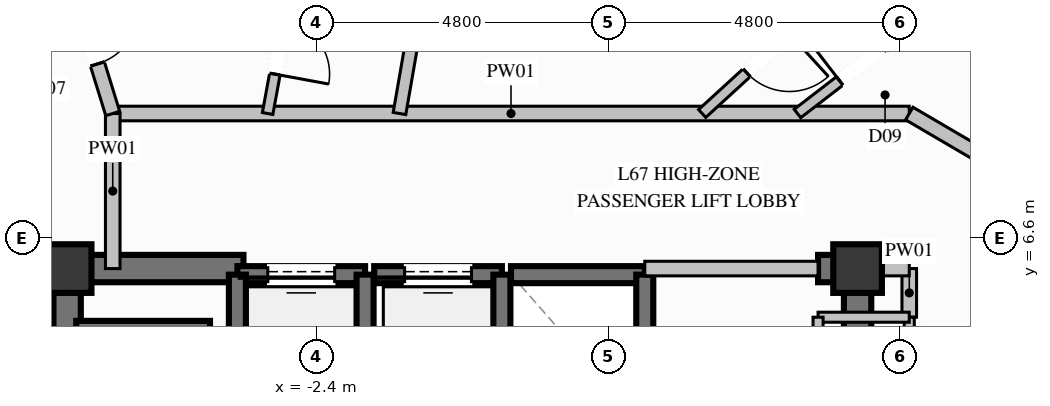
"""IFC4 building model, lengths in metres.
Left out: names, types, materials, properties, quantities, classifications, styles, units other than length and angle.
Written with IfcOpenShell. Run it as: python <this file> out.ifc"""

import sys

from ifc_helpers import new_model, si_unit, direction, frame, frame_2d, origin, origin_2d, place, context, subcontext, project, spatial, rectangle, extrude, element, fill, save


model = new_model("IFC4")
c1 = context("Model", 3, precision=1e-05, world=origin(), true_north=direction((0.0, 1.0)))
c2 = subcontext(c1, "Body", "Model", "MODEL_VIEW")
j1 = project(units=[si_unit("LENGTHUNIT", "METRE"), si_unit("PLANEANGLEUNIT", "RADIAN")], contexts=[c1])
p1 = place(None, origin())
s1 = spatial("IfcSite", under=j1, at=p1, CompositionType="ELEMENT")
p2 = place(p1, origin())
s2 = spatial("IfcBuilding", under=s1, at=p2, CompositionType="ELEMENT")
p3 = place(p2, frame((0.0, 0.0, 258.2)))
s3 = spatial("IfcBuildingStorey", under=s2, at=p3, CompositionType="ELEMENT", Elevation=258.2)
for number, where, z_axis, x_axis in (
    (1, (6.5, 6.1, 0.0), (0.0, 0.0, 1.0), (1.0, 0.0, 0.0)),
    (2, (-6.5, 6.1, 0.0), (0.0, 0.0, 1.0), (1.0, 0.0, 0.0)),
):
    element("IfcColumn", number, at=place(p3, frame(where, z_axis=z_axis, x_axis=x_axis)), inside=s3, PredefinedType="COLUMN", context=c2, shape_type="SweptSolid", body=[
        extrude(rectangle(XDim=0.8, YDim=0.8, at=origin_2d()), origin(), (0.0, 0.0, 1.0), 3.8),
    ])
p4 = place(p3, frame((-6.275, 6.1, 0.0), z_axis=(0.0, 0.0, 1.0), x_axis=(1.0, 0.0, 0.0)))
e3 = element("IfcWall", 3, at=p4, inside=s3, PredefinedType="SHEAR", context=c2, shape_type="SweptSolid", body=[
    extrude(rectangle(XDim=2.675, YDim=0.45, at=frame_2d((1.337, 0.0))), origin(), (0.0, 0.0, 1.0), 3.8),
])
p5 = place(p3, frame((5.85, 6.1, 0.0), z_axis=(0.0, 0.0, 1.0), x_axis=(1.0, 0.0, 0.0)))
e4 = element("IfcWall", 4, at=p5, inside=s3, PredefinedType="SHEAR", context=c2, shape_type="SweptSolid", body=[
    extrude(rectangle(XDim=0.425, YDim=0.45, at=frame_2d((0.212, 0.0))), origin(), (0.0, 0.0, 1.0), 3.8),
])
p6 = place(p3, frame((-6.5, 2.35, 0.0), z_axis=(0.0, 0.0, 1.0), x_axis=(0.0, 1.0, 0.0)))
e5 = element("IfcWall", 5, at=p6, inside=s3, PredefinedType="SHEAR", context=c2, shape_type="SweptSolid", body=[
    extrude(rectangle(XDim=3.975, YDim=0.45, at=frame_2d((1.987, 0.0))), origin(), (0.0, 0.0, 1.0), 3.8),
])
p7 = place(p3, frame((6.5, 3.35, 0.0), z_axis=(0.0, 0.0, 1.0), x_axis=(0.0, 1.0, 0.0)))
e6 = element("IfcWall", 6, at=p7, inside=s3, PredefinedType="SHEAR", context=c2, shape_type="SweptSolid", body=[
    extrude(rectangle(XDim=2.975, YDim=0.45, at=frame_2d((1.487, 0.0))), origin(), (0.0, 0.0, 1.0), 3.8),
])
p8 = place(p3, frame((-1.6, 6.0, 0.0), z_axis=(0.0, 0.0, 1.0), x_axis=(-1.0, 0.0, 0.0)))
e7 = element("IfcWall", 7, at=p8, inside=s3, PredefinedType="SOLIDWALL", context=c2, shape_type="SweptSolid", body=[
    extrude(rectangle(XDim=2.1, YDim=0.28, at=frame_2d((1.05, 0.0))), origin(), (0.0, 0.0, 1.0), 3.57),
])
p9 = place(p8, frame((0.5, 0.0, 0.0)))
e8 = element("IfcOpeningElement", 8, at=p9, cuts=e7, PredefinedType="OPENING", context=c2, shape_type="SweptSolid", body=[
    extrude(rectangle(XDim=1.1, YDim=2.2, at=frame_2d((0.55, 1.1))), frame((0.0, 0.15, 0.0), z_axis=(0.0, -1.0, 0.0), x_axis=(1.0, 0.0, 0.0)), (0.0, 0.0, 1.0), 0.3),
])
for number, where, z_axis, x_axis in (
    (9, (-3.7, 6.0, 0.0), (0.0, 0.0, 1.0), (0.0, -1.0, 0.0)),
    (10, (-1.6, 3.5, 0.0), (0.0, 0.0, 1.0), (0.0, 1.0, 0.0)),
):
    element("IfcWall", number, at=place(p3, frame(where, z_axis=z_axis, x_axis=x_axis)), inside=s3, PredefinedType="SOLIDWALL", context=c2, shape_type="SweptSolid", body=[
        extrude(rectangle(XDim=2.5, YDim=0.28, at=frame_2d((1.25, 0.0))), origin(), (0.0, 0.0, 1.0), 3.57),
    ])
p10 = place(p3, frame((0.65, 6.0, 0.0), z_axis=(0.0, 0.0, 1.0), x_axis=(-1.0, 0.0, 0.0)))
e11 = element("IfcWall", 11, at=p10, inside=s3, PredefinedType="SOLIDWALL", context=c2, shape_type="SweptSolid", body=[
    extrude(rectangle(XDim=2.1, YDim=0.28, at=frame_2d((1.05, 0.0))), origin(), (0.0, 0.0, 1.0), 3.57),
])
p11 = place(p10, frame((0.5, 0.0, 0.0)))
e12 = element("IfcOpeningElement", 12, at=p11, cuts=e11, PredefinedType="OPENING", context=c2, shape_type="SweptSolid", body=[
    extrude(rectangle(XDim=1.1, YDim=2.2, at=frame_2d((0.55, 1.1))), frame((0.0, 0.15, 0.0), z_axis=(0.0, -1.0, 0.0), x_axis=(1.0, 0.0, 0.0)), (0.0, 0.0, 1.0), 0.3),
])
p12 = place(p3, frame((0.65, 3.5, 0.0), z_axis=(0.0, 0.0, 1.0), x_axis=(0.0, 1.0, 0.0)))
e13 = element("IfcWall", 13, at=p12, inside=s3, PredefinedType="SOLIDWALL", context=c2, shape_type="SweptSolid", body=[
    extrude(rectangle(XDim=2.5, YDim=0.28, at=frame_2d((1.25, 0.0))), origin(), (0.0, 0.0, 1.0), 3.57),
])
p13 = place(p3, frame((3.0, 6.0, 0.0), z_axis=(0.0, 0.0, 1.0), x_axis=(-1.0, 0.0, 0.0)))
e14 = element("IfcWall", 14, at=p13, inside=s3, PredefinedType="SOLIDWALL", context=c2, shape_type="SweptSolid", body=[
    extrude(rectangle(XDim=2.2, YDim=0.28, at=frame_2d((1.1, 0.0))), origin(), (0.0, 0.0, 1.0), 3.57),
])
p14 = place(p3, frame((3.0, 3.5, 0.0), z_axis=(0.0, 0.0, 1.0), x_axis=(0.0, 1.0, 0.0)))
e15 = element("IfcWall", 15, at=p14, inside=s3, PredefinedType="SOLIDWALL", context=c2, shape_type="SweptSolid", body=[
    extrude(rectangle(XDim=2.5, YDim=0.28, at=frame_2d((1.25, 0.0))), origin(), (0.0, 0.0, 1.0), 3.57),
])
p15 = place(p3, frame((-4.15, 5.1, 0.0), z_axis=(0.0, 0.0, 1.0), x_axis=(-1.0, 0.0, 0.0)))
e16 = element("IfcWall", 16, at=p15, inside=s3, PredefinedType="SOLIDWALL", context=c2, shape_type="SweptSolid", body=[
    extrude(rectangle(XDim=2.2, YDim=0.28, at=frame_2d((1.1, 0.0))), origin(), (0.0, 0.0, 1.0), 3.57),
])
p16 = place(p3, frame((-5.75, 8.65, 0.0), z_axis=(0.0, 0.0, 1.0), x_axis=(1.0, 0.0, 0.0)))
e17 = element("IfcWall", 17, at=p16, inside=s3, PredefinedType="PARTITIONING", context=c2, shape_type="SweptSolid", body=[
    extrude(rectangle(XDim=13.1, YDim=0.24, at=frame_2d((6.55, 0.0))), origin(), (0.0, 0.0, 1.0), 3.57),
])
p17 = place(p3, frame((3.0, 6.1, 0.0), z_axis=(0.0, 0.0, 1.0), x_axis=(1.0, 0.0, 0.0)))
e18 = element("IfcWall", 18, at=p17, inside=s3, PredefinedType="PARTITIONING", context=c2, shape_type="SweptSolid", body=[
    extrude(rectangle(XDim=2.85, YDim=0.24, at=frame_2d((1.425, 0.0))), origin(), (0.0, 0.0, 1.0), 2.655),
])
p18 = place(p3, frame((7.35, 5.3, 0.0), z_axis=(0.0, 0.0, 1.0), x_axis=(0.0, 1.0, 0.0)))
e19 = element("IfcWall", 19, at=p18, inside=s3, PredefinedType="PARTITIONING", context=c2, shape_type="SweptSolid", body=[
    extrude(rectangle(XDim=0.8, YDim=0.24, at=frame_2d((0.4, 0.0))), origin(), (0.0, 0.0, 1.0), 2.655),
])
p19 = place(p3, frame((6.5, 6.1, 0.0), z_axis=(0.0, 0.0, 1.0), x_axis=(1.0, 0.0, 0.0)))
e20 = element("IfcWall", 20, at=p19, inside=s3, PredefinedType="PARTITIONING", context=c2, shape_type="SweptSolid", body=[
    extrude(rectangle(XDim=0.85, YDim=0.24, at=frame_2d((0.425, 0.0))), origin(), (0.0, 0.0, 1.0), 3.085),
])
p20 = place(p3, frame((-5.75, 6.1, 0.0), z_axis=(0.0, 0.0, 1.0), x_axis=(0.0, 1.0, 0.0)))
e21 = element("IfcWall", 21, at=p20, inside=s3, PredefinedType="PARTITIONING", context=c2, shape_type="SweptSolid", body=[
    extrude(rectangle(XDim=2.55, YDim=0.24, at=frame_2d((1.275, 0.0))), origin(), (0.0, 0.0, 1.0), 3.57),
])
p21 = place(p3, frame((-7.35, 6.1, 0.0), z_axis=(0.0, 0.0, 1.0), x_axis=(1.0, 0.0, 0.0)))
e22 = element("IfcWall", 22, at=p21, inside=s3, PredefinedType="PARTITIONING", context=c2, shape_type="SweptSolid", body=[
    extrude(rectangle(XDim=0.85, YDim=0.24, at=frame_2d((0.425, 0.0))), origin(), (0.0, 0.0, 1.0), 3.085),
])
p22 = place(p3, frame((7.35, 3.35, 0.0), z_axis=(0.0, 0.0, 1.0), x_axis=(0.0, 1.0, 0.0)))
e23 = element("IfcWall", 23, at=p22, inside=s3, PredefinedType="PARTITIONING", context=c2, shape_type="SweptSolid", body=[
    extrude(rectangle(XDim=1.95, YDim=0.165, at=frame_2d((0.975, 0.0))), origin(), (0.0, 0.0, 1.0), 3.57),
])
p23 = place(p22, frame((0.5, 0.0, 0.0)))
e24 = element("IfcOpeningElement", 24, at=p23, cuts=e23, PredefinedType="OPENING", context=c2, shape_type="SweptSolid", body=[
    extrude(rectangle(XDim=0.95, YDim=2.1, at=frame_2d((0.475, 1.05))), frame((0.0, 0.093, 0.0), z_axis=(0.0, -1.0, 0.0), x_axis=(1.0, 0.0, 0.0)), (0.0, 0.0, 1.0), 0.185),
])
p24 = place(p3, frame((7.35, 5.3, 0.0), z_axis=(0.0, 0.0, 1.0), x_axis=(-1.0, 0.0, 0.0)))
e25 = element("IfcWall", 25, at=p24, inside=s3, PredefinedType="PARTITIONING", context=c2, shape_type="SweptSolid", body=[
    extrude(rectangle(XDim=1.5, YDim=0.165, at=frame_2d((0.75, 0.0))), origin(), (0.0, 0.0, 1.0), 2.655),
])
p25 = place(p3, frame((5.85, 5.3, 0.0), z_axis=(0.0, 0.0, 1.0), x_axis=(0.0, -1.0, 0.0)))
e26 = element("IfcWall", 26, at=p25, inside=s3, PredefinedType="PARTITIONING", context=c2, shape_type="SweptSolid", body=[
    extrude(rectangle(XDim=1.95, YDim=0.165, at=frame_2d((0.975, 0.0))), origin(), (0.0, 0.0, 1.0), 2.655),
])
p26 = place(p3, frame((6.11, 10.632, 0.0), z_axis=(0.0, 0.0, 1.0), x_axis=(-0.737719939181, -0.675106874009, 0.0)))
e27 = element("IfcWall", 27, at=p26, inside=s3, PredefinedType="PLUMBINGWALL", context=c2, shape_type="SweptSolid", body=[
    extrude(rectangle(XDim=2.936, YDim=0.175, at=frame_2d((1.468, 0.0))), origin(), (0.0, 0.0, 1.0), 3.57),
])
p27 = place(p26, frame((0.993, 0.0, 0.0)))
e28 = element("IfcOpeningElement", 28, at=p27, cuts=e27, PredefinedType="OPENING", context=c2, shape_type="SweptSolid", body=[
    extrude(rectangle(XDim=0.95, YDim=2.1, at=frame_2d((0.475, 1.05))), frame((0.0, 0.098, 0.0), z_axis=(0.0, -1.0, 0.0), x_axis=(1.0, 0.0, 0.0)), (0.0, 0.0, 1.0), 0.195),
])
p28 = place(p3, frame((5.511, 8.65, 0.0), z_axis=(0.0, 0.0, 1.0), x_axis=(0.792282263308, 0.610154746969, 0.0)))
e29 = element("IfcWall", 29, at=p28, inside=s3, PredefinedType="PLUMBINGWALL", context=c2, shape_type="SweptSolid", body=[
    extrude(rectangle(XDim=2.657, YDim=0.175, at=frame_2d((1.328, 0.0))), origin(), (0.0, 0.0, 1.0), 3.57),
])
p29 = place(p28, frame((0.878, 0.0, 0.0)))
e30 = element("IfcOpeningElement", 30, at=p29, cuts=e29, PredefinedType="OPENING", context=c2, shape_type="SweptSolid", body=[
    extrude(rectangle(XDim=0.9, YDim=2.1, at=frame_2d((0.45, 1.05))), frame((0.0, 0.098, 0.0), z_axis=(0.0, -1.0, 0.0), x_axis=(1.0, 0.0, 0.0)), (0.0, 0.0, 1.0), 0.195),
])
p30 = place(p3, frame((7.35, 8.65, 0.0), z_axis=(0.0, 0.0, 1.0), x_axis=(0.862873842462, -0.505419362505, 0.0)))
e31 = element("IfcWall", 31, at=p30, inside=s3, PredefinedType="PARTITIONING", context=c2, shape_type="SweptSolid", body=[
    extrude(rectangle(XDim=4.155, YDim=0.24, at=frame_2d((2.077, 0.0))), origin(), (0.0, 0.0, 1.0), 3.57),
])
p31 = place(p30, frame((1.577, 0.0, 0.0)))
e32 = element("IfcOpeningElement", 32, at=p31, cuts=e31, PredefinedType="OPENING", context=c2, shape_type="SweptSolid", body=[
    extrude(rectangle(XDim=1.0, YDim=2.2, at=frame_2d((0.5, 1.1))), frame((0.0, 0.13, 0.0), z_axis=(0.0, -1.0, 0.0), x_axis=(1.0, 0.0, 0.0)), (0.0, 0.0, 1.0), 0.26),
])
p32 = place(p3, frame((-1.034, 8.65, 0.0), z_axis=(0.0, 0.0, 1.0), x_axis=(0.171292106425, 0.985220287183, 0.0)))
e33 = element("IfcWall", 33, at=p32, inside=s3, PredefinedType="PARTITIONING", context=c2, shape_type="SweptSolid", body=[
    extrude(rectangle(XDim=6.509, YDim=0.21, at=frame_2d((3.255, 0.0))), origin(), (0.0, 0.0, 1.0), 3.57),
])
p33 = place(p3, frame((-2.801, 10.83, 0.0), z_axis=(0.0, 0.0, 1.0), x_axis=(-0.181268941006, -0.983433562081, 0.0)))
e34 = element("IfcWall", 34, at=p33, inside=s3, PredefinedType="PLUMBINGWALL", context=c2, shape_type="SweptSolid", body=[
    extrude(rectangle(XDim=2.217, YDim=0.175, at=frame_2d((1.108, 0.0))), origin(), (0.0, 0.0, 1.0), 3.57),
])
p34 = place(p33, frame((0.658, 0.0, 0.0)))
e35 = element("IfcOpeningElement", 35, at=p34, cuts=e34, PredefinedType="OPENING", context=c2, shape_type="SweptSolid", body=[
    extrude(rectangle(XDim=0.9, YDim=2.1, at=frame_2d((0.45, 1.05))), frame((0.0, 0.098, 0.0), z_axis=(0.0, -1.0, 0.0), x_axis=(1.0, 0.0, 0.0)), (0.0, 0.0, 1.0), 0.195),
])
p35 = place(p3, frame((-6.55, 11.235, 0.0), z_axis=(0.0, 0.0, 1.0), x_axis=(0.295638642954, -0.955299844443, 0.0)))
e36 = element("IfcWall", 36, at=p35, inside=s3, PredefinedType="PARTITIONING", context=c2, shape_type="SweptSolid", body=[
    extrude(rectangle(XDim=2.706, YDim=0.24, at=frame_2d((1.353, 0.0))), origin(), (0.0, 0.0, 1.0), 3.57),
])
p36 = place(p35, frame((0.853, 0.0, 0.0)))
e37 = element("IfcOpeningElement", 37, at=p36, cuts=e36, PredefinedType="OPENING", context=c2, shape_type="SweptSolid", body=[
    extrude(rectangle(XDim=1.0, YDim=2.2, at=frame_2d((0.5, 1.1))), frame((0.0, 0.13, 0.0), z_axis=(0.0, -1.0, 0.0), x_axis=(1.0, 0.0, 0.0)), (0.0, 0.0, 1.0), 0.26),
])
p37 = place(p3, frame((-6.55, 11.235, 0.0), z_axis=(0.0, 0.0, 1.0), x_axis=(-0.707106781187, -0.707106781187, 0.0)))
e38 = element("IfcWall", 38, at=p37, inside=s3, PredefinedType="PARTITIONING", context=c2, shape_type="SweptSolid", body=[
    extrude(rectangle(XDim=2.783, YDim=0.24, at=frame_2d((1.392, 0.0))), origin(), (0.0, 0.0, 1.0), 3.57),
])
p38 = place(p9, origin())
e39 = element("IfcDoor", 39, at=p38, inside=s3, OperationType="SLIDING_TO_LEFT", PredefinedType="DOOR", context=c2, shape_type="SweptSolid", body=[
    extrude(rectangle(XDim=1.1, YDim=2.2, at=frame_2d((0.55, 1.1))), frame((0.0, 0.025, 0.0), z_axis=(0.0, -1.0, 0.0), x_axis=(1.0, 0.0, 0.0)), (0.0, 0.0, 1.0), 0.05),
])
fill(e8, e39)
p39 = place(p11, origin())
e40 = element("IfcDoor", 40, at=p39, inside=s3, OperationType="SLIDING_TO_LEFT", PredefinedType="DOOR", context=c2, shape_type="SweptSolid", body=[
    extrude(rectangle(XDim=1.1, YDim=2.2, at=frame_2d((0.55, 1.1))), frame((0.0, 0.025, 0.0), z_axis=(0.0, -1.0, 0.0), x_axis=(1.0, 0.0, 0.0)), (0.0, 0.0, 1.0), 0.05),
])
fill(e12, e40)
p40 = place(p29, origin())
e41 = element("IfcDoor", 41, at=p40, inside=s3, OperationType="SINGLE_SWING_LEFT", PredefinedType="DOOR", context=c2, shape_type="SweptSolid", body=[
    extrude(rectangle(XDim=0.9, YDim=2.1, at=frame_2d((0.45, 1.05))), frame((0.0, 0.025, 0.0), z_axis=(0.0, -1.0, 0.0), x_axis=(1.0, 0.0, 0.0)), (0.0, 0.0, 1.0), 0.05),
])
fill(e30, e41)
p41 = place(p27, origin())
e42 = element("IfcDoor", 42, at=p41, inside=s3, OperationType="SINGLE_SWING_LEFT", PredefinedType="DOOR", context=c2, shape_type="SweptSolid", body=[
    extrude(rectangle(XDim=0.95, YDim=2.1, at=frame_2d((0.475, 1.05))), frame((0.0, 0.025, 0.0), z_axis=(0.0, -1.0, 0.0), x_axis=(1.0, 0.0, 0.0)), (0.0, 0.0, 1.0), 0.05),
])
fill(e28, e42)
p42 = place(p34, origin())
e43 = element("IfcDoor", 43, at=p42, inside=s3, OperationType="SINGLE_SWING_RIGHT", PredefinedType="DOOR", context=c2, shape_type="SweptSolid", body=[
    extrude(rectangle(XDim=0.9, YDim=2.1, at=frame_2d((0.45, 1.05))), frame((0.0, 0.025, 0.0), z_axis=(0.0, -1.0, 0.0), x_axis=(1.0, 0.0, 0.0)), (0.0, 0.0, 1.0), 0.05),
])
fill(e35, e43)
p43 = place(p36, origin())
e44 = element("IfcDoor", 44, at=p43, inside=s3, OperationType="SINGLE_SWING_LEFT", PredefinedType="DOOR", context=c2, shape_type="SweptSolid", body=[
    extrude(rectangle(XDim=1.0, YDim=2.2, at=frame_2d((0.5, 1.1))), frame((0.0, 0.025, 0.0), z_axis=(0.0, -1.0, 0.0), x_axis=(1.0, 0.0, 0.0)), (0.0, 0.0, 1.0), 0.05),
])
fill(e37, e44)
save(model, sys.argv[1])
